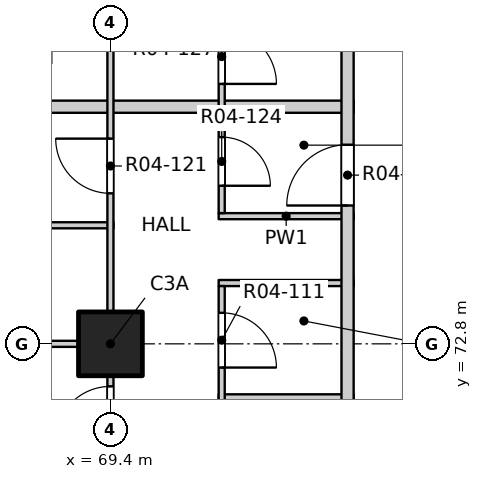
"""IFC4 building model, lengths in metres.
Left out: names, types, materials, properties, quantities, classifications, styles, units other than length and angle.
Written with IfcOpenShell. Run it as: python <this file> out.ifc"""

import sys

from ifc_helpers import new_model, si_unit, direction, frame, frame_2d, origin, origin_2d, place, context, subcontext, project, spatial, rectangle, extrude, element, fill, save


model = new_model("IFC4")
c1 = context("Model", 3, precision=1e-05, world=origin(), true_north=direction((0.0, 1.0)))
c2 = subcontext(c1, "Body", "Model", "MODEL_VIEW")
j1 = project(units=[si_unit("LENGTHUNIT", "METRE"), si_unit("PLANEANGLEUNIT", "RADIAN")], contexts=[c1])
p1 = place(None, origin())
s1 = spatial("IfcSite", under=j1, at=p1, CompositionType="ELEMENT")
p2 = place(p1, origin())
s2 = spatial("IfcBuilding", under=s1, at=p2, CompositionType="ELEMENT")
p3 = place(p2, frame((0.0, 0.0, 58.0)))
s3 = spatial("IfcBuildingStorey", under=s2, at=p3, CompositionType="ELEMENT", Elevation=58.0)
p4 = place(p3, frame((69.4, 72.8, -0.25), z_axis=(0.0, 0.0, 1.0), x_axis=(1.0, 0.0, 0.0)))
e1 = element("IfcColumn", 1, at=p4, inside=s3, PredefinedType="COLUMN", context=c2, shape_type="SweptSolid", body=[
    extrude(rectangle(XDim=1.05, YDim=1.05, at=origin_2d()), origin(), (0.0, 0.0, 1.0), 3.4),
])
p5 = place(p3, frame((71.18, 71.92, 0.0), z_axis=(0.0, 0.0, 1.0), x_axis=(1.0, 0.0, 0.0)))
e2 = element("IfcWall", 2, at=p5, inside=s3, PredefinedType="PARTITIONING", context=c2, shape_type="SweptSolid", body=[
    extrude(rectangle(XDim=2.22, YDim=0.1, at=frame_2d((1.11, 0.0))), origin(), (0.0, 0.0, 1.0), 3.15),
])
p6 = place(p3, frame((61.9, 72.8, 0.0), z_axis=(0.0, 0.0, 1.0), x_axis=(1.0, 0.0, 0.0)))
e3 = element("IfcWall", 3, at=p6, inside=s3, PredefinedType="PARTITIONING", context=c2, shape_type="SweptSolid", body=[
    extrude(rectangle(XDim=7.55, YDim=0.1, at=frame_2d((3.775, 0.0))), origin(), (0.0, 0.0, 1.0), 2.55),
])
p7 = place(p3, frame((71.18, 73.8, 0.0), z_axis=(0.0, 0.0, 1.0), x_axis=(1.0, 0.0, 0.0)))
e4 = element("IfcWall", 4, at=p7, inside=s3, PredefinedType="PARTITIONING", context=c2, shape_type="SweptSolid", body=[
    extrude(rectangle(XDim=2.22, YDim=0.1, at=frame_2d((1.11, 0.0))), origin(), (0.0, 0.0, 1.0), 3.15),
])
p8 = place(p3, frame((65.75, 74.75, 0.0), z_axis=(0.0, 0.0, 1.0), x_axis=(1.0, 0.0, 0.0)))
e5 = element("IfcWall", 5, at=p8, inside=s3, PredefinedType="PARTITIONING", context=c2, shape_type="SweptSolid", body=[
    extrude(rectangle(XDim=3.7, YDim=0.1, at=frame_2d((1.85, 0.0))), origin(), (0.0, 0.0, 1.0), 3.15),
])
p9 = place(p3, frame((71.18, 74.9, 0.0), z_axis=(0.0, 0.0, 1.0), x_axis=(1.0, 0.0, 0.0)))
e6 = element("IfcWall", 6, at=p9, inside=s3, PredefinedType="PARTITIONING", context=c2, shape_type="SweptSolid", body=[
    extrude(rectangle(XDim=2.22, YDim=0.1, at=frame_2d((1.11, 0.0))), origin(), (0.0, 0.0, 1.0), 3.15),
])
p10 = place(p3, frame((61.9, 76.7, 0.0), z_axis=(0.0, 0.0, 1.0), x_axis=(1.0, 0.0, 0.0)))
e7 = element("IfcWall", 7, at=p10, inside=s3, PredefinedType="PARTITIONING", context=c2, shape_type="SweptSolid", body=[
    extrude(rectangle(XDim=11.5, YDim=0.2, at=frame_2d((5.75, 0.0))), origin(), (0.0, 0.0, 1.0), 3.15),
])
p11 = place(p3, frame((69.4, 49.4, 0.0), z_axis=(0.0, 0.0, 1.0), x_axis=(0.0, 1.0, 0.0)))
e8 = element("IfcWall", 8, at=p11, inside=s3, PredefinedType="PARTITIONING", context=c2, shape_type="SweptSolid", body=[
    extrude(rectangle(XDim=31.2, YDim=0.1, at=frame_2d((15.6, 0.0))), origin(), (0.0, 0.0, 1.0), 3.15),
])
p12 = place(p11, frame((2.475, 0.0, 0.0)))
e9 = element("IfcOpeningElement", 9, at=p12, cuts=e8, PredefinedType="OPENING", context=c2, shape_type="SweptSolid", body=[
    extrude(rectangle(XDim=0.9, YDim=2.1, at=frame_2d((0.45, 1.05))), frame((0.0, 0.06, 0.0), z_axis=(0.0, -1.0, 0.0), x_axis=(1.0, 0.0, 0.0)), (0.0, 0.0, 1.0), 0.12),
])
p13 = place(p11, frame((5.4, 0.0, 0.0)))
e10 = element("IfcOpeningElement", 10, at=p13, cuts=e8, PredefinedType="OPENING", context=c2, shape_type="SweptSolid", body=[
    extrude(rectangle(XDim=0.9, YDim=2.1, at=frame_2d((0.45, 1.05))), frame((0.0, 0.06, 0.0), z_axis=(0.0, -1.0, 0.0), x_axis=(1.0, 0.0, 0.0)), (0.0, 0.0, 1.0), 0.12),
])
p14 = place(p11, frame((10.275, 0.0, 0.0)))
e11 = element("IfcOpeningElement", 11, at=p14, cuts=e8, PredefinedType="OPENING", context=c2, shape_type="SweptSolid", body=[
    extrude(rectangle(XDim=0.9, YDim=2.1, at=frame_2d((0.45, 1.05))), frame((0.0, 0.06, 0.0), z_axis=(0.0, -1.0, 0.0), x_axis=(1.0, 0.0, 0.0)), (0.0, 0.0, 1.0), 0.12),
])
p15 = place(p11, frame((13.2, 0.0, 0.0)))
e12 = element("IfcOpeningElement", 12, at=p15, cuts=e8, PredefinedType="OPENING", context=c2, shape_type="SweptSolid", body=[
    extrude(rectangle(XDim=0.9, YDim=2.1, at=frame_2d((0.45, 1.05))), frame((0.0, 0.06, 0.0), z_axis=(0.0, -1.0, 0.0), x_axis=(1.0, 0.0, 0.0)), (0.0, 0.0, 1.0), 0.12),
])
p16 = place(p11, frame((18.075, 0.0, 0.0)))
e13 = element("IfcOpeningElement", 13, at=p16, cuts=e8, PredefinedType="OPENING", context=c2, shape_type="SweptSolid", body=[
    extrude(rectangle(XDim=0.9, YDim=2.1, at=frame_2d((0.45, 1.05))), frame((0.0, 0.06, 0.0), z_axis=(0.0, -1.0, 0.0), x_axis=(1.0, 0.0, 0.0)), (0.0, 0.0, 1.0), 0.12),
])
p17 = place(p11, frame((21.8, 0.0, 0.0)))
e14 = element("IfcOpeningElement", 14, at=p17, cuts=e8, PredefinedType="OPENING", context=c2, shape_type="SweptSolid", body=[
    extrude(rectangle(XDim=0.9, YDim=2.1, at=frame_2d((0.45, 1.05))), frame((0.0, 0.06, 0.0), z_axis=(0.0, -1.0, 0.0), x_axis=(1.0, 0.0, 0.0)), (0.0, 0.0, 1.0), 0.12),
])
p18 = place(p11, frame((25.875, 0.0, 0.0)))
e15 = element("IfcOpeningElement", 15, at=p18, cuts=e8, PredefinedType="OPENING", context=c2, shape_type="SweptSolid", body=[
    extrude(rectangle(XDim=0.9, YDim=2.1, at=frame_2d((0.45, 1.05))), frame((0.0, 0.06, 0.0), z_axis=(0.0, -1.0, 0.0), x_axis=(1.0, 0.0, 0.0)), (0.0, 0.0, 1.0), 0.12),
])
p19 = place(p11, frame((29.6, 0.0, 0.0)))
e16 = element("IfcOpeningElement", 16, at=p19, cuts=e8, PredefinedType="OPENING", context=c2, shape_type="SweptSolid", body=[
    extrude(rectangle(XDim=0.9, YDim=2.1, at=frame_2d((0.45, 1.05))), frame((0.0, 0.06, 0.0), z_axis=(0.0, -1.0, 0.0), x_axis=(1.0, 0.0, 0.0)), (0.0, 0.0, 1.0), 0.12),
])
p20 = place(p3, frame((71.23, 56.6, 0.0), z_axis=(0.0, 0.0, 1.0), x_axis=(0.0, 1.0, 0.0)))
e17 = element("IfcWall", 17, at=p20, inside=s3, PredefinedType="PARTITIONING", context=c2, shape_type="SweptSolid", body=[
    extrude(rectangle(XDim=17.15, YDim=0.1, at=frame_2d((8.575, 0.0))), origin(), (0.0, 0.0, 1.0), 3.15),
])
p21 = place(p20, frame((0.85, 0.0, 0.0)))
e18 = element("IfcOpeningElement", 18, at=p21, cuts=e17, PredefinedType="OPENING", context=c2, shape_type="SweptSolid", body=[
    extrude(rectangle(XDim=0.9, YDim=2.1, at=frame_2d((0.45, 1.05))), frame((0.0, 0.06, 0.0), z_axis=(0.0, -1.0, 0.0), x_axis=(1.0, 0.0, 0.0)), (0.0, 0.0, 1.0), 0.12),
])
p22 = place(p20, frame((3.175, 0.0, 0.0)))
e19 = element("IfcOpeningElement", 19, at=p22, cuts=e17, PredefinedType="OPENING", context=c2, shape_type="SweptSolid", body=[
    extrude(rectangle(XDim=0.8, YDim=2.1, at=frame_2d((0.4, 1.05))), frame((0.0, 0.06, 0.0), z_axis=(0.0, -1.0, 0.0), x_axis=(1.0, 0.0, 0.0)), (0.0, 0.0, 1.0), 0.12),
])
p23 = place(p20, frame((5.66, 0.0, 0.0)))
e20 = element("IfcOpeningElement", 20, at=p23, cuts=e17, PredefinedType="OPENING", context=c2, shape_type="SweptSolid", body=[
    extrude(rectangle(XDim=0.9, YDim=2.1, at=frame_2d((0.45, 1.05))), frame((0.0, 0.06, 0.0), z_axis=(0.0, -1.0, 0.0), x_axis=(1.0, 0.0, 0.0)), (0.0, 0.0, 1.0), 0.12),
])
p24 = place(p20, frame((8.62, 0.0, 0.0)))
e21 = element("IfcOpeningElement", 21, at=p24, cuts=e17, PredefinedType="OPENING", context=c2, shape_type="SweptSolid", body=[
    extrude(rectangle(XDim=0.8, YDim=2.1, at=frame_2d((0.4, 1.05))), frame((0.0, 0.06, 0.0), z_axis=(0.0, -1.0, 0.0), x_axis=(1.0, 0.0, 0.0)), (0.0, 0.0, 1.0), 0.12),
])
p25 = place(p20, frame((11.22, 0.0, 0.0)))
e22 = element("IfcOpeningElement", 22, at=p25, cuts=e17, PredefinedType="OPENING", context=c2, shape_type="SweptSolid", body=[
    extrude(rectangle(XDim=0.8, YDim=2.1, at=frame_2d((0.4, 1.05))), frame((0.0, 0.06, 0.0), z_axis=(0.0, -1.0, 0.0), x_axis=(1.0, 0.0, 0.0)), (0.0, 0.0, 1.0), 0.12),
])
p26 = place(p20, frame((13.67, 0.0, 0.0)))
e23 = element("IfcOpeningElement", 23, at=p26, cuts=e17, PredefinedType="OPENING", context=c2, shape_type="SweptSolid", body=[
    extrude(rectangle(XDim=0.9, YDim=2.1, at=frame_2d((0.45, 1.05))), frame((0.0, 0.06, 0.0), z_axis=(0.0, -1.0, 0.0), x_axis=(1.0, 0.0, 0.0)), (0.0, 0.0, 1.0), 0.12),
])
p27 = place(p20, frame((15.81, 0.0, 0.0)))
e24 = element("IfcOpeningElement", 24, at=p27, cuts=e17, PredefinedType="OPENING", context=c2, shape_type="SweptSolid", body=[
    extrude(rectangle(XDim=0.9, YDim=2.1, at=frame_2d((0.45, 1.05))), frame((0.0, 0.06, 0.0), z_axis=(0.0, -1.0, 0.0), x_axis=(1.0, 0.0, 0.0)), (0.0, 0.0, 1.0), 0.12),
])
p28 = place(p3, frame((71.23, 74.95, 0.0), z_axis=(0.0, 0.0, 1.0), x_axis=(0.0, 1.0, 0.0)))
e25 = element("IfcWall", 25, at=p28, inside=s3, PredefinedType="PARTITIONING", context=c2, shape_type="SweptSolid", body=[
    extrude(rectangle(XDim=3.35, YDim=0.1, at=frame_2d((1.675, 0.0))), origin(), (0.0, 0.0, 1.0), 3.15),
])
p29 = place(p28, frame((0.45, 0.0, 0.0)))
e26 = element("IfcOpeningElement", 26, at=p29, cuts=e25, PredefinedType="OPENING", context=c2, shape_type="SweptSolid", body=[
    extrude(rectangle(XDim=0.8, YDim=2.1, at=frame_2d((0.4, 1.05))), frame((0.0, 0.06, 0.0), z_axis=(0.0, -1.0, 0.0), x_axis=(1.0, 0.0, 0.0)), (0.0, 0.0, 1.0), 0.12),
])
p30 = place(p28, frame((2.125, 0.0, 0.0)))
e27 = element("IfcOpeningElement", 27, at=p30, cuts=e25, PredefinedType="OPENING", context=c2, shape_type="SweptSolid", body=[
    extrude(rectangle(XDim=0.9, YDim=2.1, at=frame_2d((0.45, 1.05))), frame((0.0, 0.06, 0.0), z_axis=(0.0, -1.0, 0.0), x_axis=(1.0, 0.0, 0.0)), (0.0, 0.0, 1.0), 0.12),
])
p31 = place(p3, frame((73.3, 53.4, 0.0), z_axis=(0.0, 0.0, 1.0), x_axis=(0.0, 1.0, 0.0)))
e28 = element("IfcWall", 28, at=p31, inside=s3, PredefinedType="PARTITIONING", context=c2, shape_type="SweptSolid", body=[
    extrude(rectangle(XDim=31.0, YDim=0.2, at=frame_2d((15.5, 0.0))), origin(), (0.0, 0.0, 1.0), 3.15),
])
p32 = place(p31, frame((3.325, 0.0, 0.0)))
e29 = element("IfcOpeningElement", 29, at=p32, cuts=e28, PredefinedType="OPENING", context=c2, shape_type="SweptSolid", body=[
    extrude(rectangle(XDim=1.0, YDim=2.1, at=frame_2d((0.5, 1.05))), frame((0.0, 0.11, 0.0), z_axis=(0.0, -1.0, 0.0), x_axis=(1.0, 0.0, 0.0)), (0.0, 0.0, 1.0), 0.22),
])
p33 = place(p31, frame((21.675, 0.0, 0.0)))
e30 = element("IfcOpeningElement", 30, at=p33, cuts=e28, PredefinedType="OPENING", context=c2, shape_type="SweptSolid", body=[
    extrude(rectangle(XDim=1.0, YDim=2.1, at=frame_2d((0.5, 1.05))), frame((0.0, 0.11, 0.0), z_axis=(0.0, -1.0, 0.0), x_axis=(1.0, 0.0, 0.0)), (0.0, 0.0, 1.0), 0.22),
])
p34 = place(p31, frame((26.225, 0.0, 0.0)))
e31 = element("IfcOpeningElement", 31, at=p34, cuts=e28, PredefinedType="OPENING", context=c2, shape_type="SweptSolid", body=[
    extrude(rectangle(XDim=1.0, YDim=2.1, at=frame_2d((0.5, 1.05))), frame((0.0, 0.11, 0.0), z_axis=(0.0, -1.0, 0.0), x_axis=(1.0, 0.0, 0.0)), (0.0, 0.0, 1.0), 0.22),
])
p35 = place(p17, origin())
e32 = element("IfcDoor", 32, at=p35, inside=s3, OperationType="SINGLE_SWING_LEFT", PredefinedType="DOOR", context=c2, shape_type="SweptSolid", body=[
    extrude(rectangle(XDim=0.9, YDim=2.1, at=frame_2d((0.45, 1.05))), frame((0.0, 0.025, 0.0), z_axis=(0.0, -1.0, 0.0), x_axis=(1.0, 0.0, 0.0)), (0.0, 0.0, 1.0), 0.05),
])
fill(e14, e32)
p36 = place(p27, origin())
e33 = element("IfcDoor", 33, at=p36, inside=s3, OperationType="SINGLE_SWING_RIGHT", PredefinedType="DOOR", context=c2, shape_type="SweptSolid", body=[
    extrude(rectangle(XDim=0.9, YDim=2.1, at=frame_2d((0.45, 1.05))), frame((0.0, 0.025, 0.0), z_axis=(0.0, -1.0, 0.0), x_axis=(1.0, 0.0, 0.0)), (0.0, 0.0, 1.0), 0.05),
])
fill(e24, e33)
p37 = place(p33, origin())
e34 = element("IfcDoor", 34, at=p37, inside=s3, OperationType="SINGLE_SWING_RIGHT", PredefinedType="DOOR", context=c2, shape_type="SweptSolid", body=[
    extrude(rectangle(XDim=1.0, YDim=2.1, at=frame_2d((0.5, 1.05))), frame((0.0, 0.025, 0.0), z_axis=(0.0, -1.0, 0.0), x_axis=(1.0, 0.0, 0.0)), (0.0, 0.0, 1.0), 0.05),
])
fill(e30, e34)
p38 = place(p18, origin())
e35 = element("IfcDoor", 35, at=p38, inside=s3, OperationType="SINGLE_SWING_RIGHT", PredefinedType="DOOR", context=c2, shape_type="SweptSolid", body=[
    extrude(rectangle(XDim=0.9, YDim=2.1, at=frame_2d((0.45, 1.05))), frame((0.0, 0.025, 0.0), z_axis=(0.0, -1.0, 0.0), x_axis=(1.0, 0.0, 0.0)), (0.0, 0.0, 1.0), 0.05),
])
fill(e15, e35)
p39 = place(p29, origin())
e36 = element("IfcDoor", 36, at=p39, inside=s3, OperationType="SINGLE_SWING_RIGHT", PredefinedType="DOOR", context=c2, shape_type="SweptSolid", body=[
    extrude(rectangle(XDim=0.8, YDim=2.1, at=frame_2d((0.4, 1.05))), frame((0.0, 0.025, 0.0), z_axis=(0.0, -1.0, 0.0), x_axis=(1.0, 0.0, 0.0)), (0.0, 0.0, 1.0), 0.05),
])
fill(e26, e36)
p40 = place(p30, origin())
e37 = element("IfcDoor", 37, at=p40, inside=s3, OperationType="SINGLE_SWING_RIGHT", PredefinedType="DOOR", context=c2, shape_type="SweptSolid", body=[
    extrude(rectangle(XDim=0.9, YDim=2.1, at=frame_2d((0.45, 1.05))), frame((0.0, 0.025, 0.0), z_axis=(0.0, -1.0, 0.0), x_axis=(1.0, 0.0, 0.0)), (0.0, 0.0, 1.0), 0.05),
])
fill(e27, e37)
save(model, sys.argv[1])
